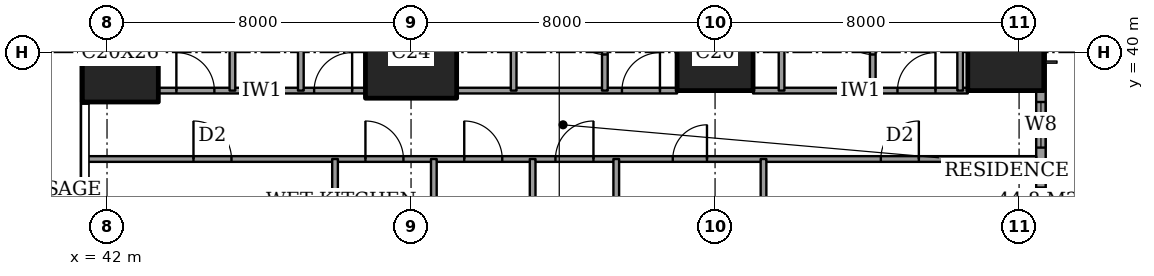
"""IFC4 building model, lengths in metres.
Left out: names, types, materials, properties, quantities, classifications, styles, units other than length and angle.
Written with IfcOpenShell. Run it as: python <this file> out.ifc"""

import sys

from ifc_helpers import new_model, si_unit, direction, frame, frame_2d, origin, origin_2d, place, context, subcontext, project, spatial, rectangle, extrude, element, fill, save


model = new_model("IFC4")
c1 = context("Model", 3, precision=1e-05, world=origin(), true_north=direction((0.0, 1.0)))
c2 = subcontext(c1, "Body", "Model", "MODEL_VIEW")
j1 = project(units=[si_unit("LENGTHUNIT", "METRE"), si_unit("PLANEANGLEUNIT", "RADIAN")], contexts=[c1])
p1 = place(None, origin())
s1 = spatial("IfcSite", under=j1, at=p1, CompositionType="ELEMENT")
p2 = place(p1, origin())
s2 = spatial("IfcBuilding", under=s1, at=p2, CompositionType="ELEMENT")
p3 = place(p2, frame((0.0, 0.0, 65.6)))
s3 = spatial("IfcBuildingStorey", under=s2, at=p3, CompositionType="ELEMENT", Elevation=65.6)
p4 = place(p3, frame((42.35, 40.0, 0.0), z_axis=(0.0, 0.0, 1.0), x_axis=(1.0, 0.0, 0.0)))
e1 = element("IfcColumn", 1, at=p4, inside=s3, PredefinedType="COLUMN", context=c2, shape_type="SweptSolid", body=[
    extrude(rectangle(XDim=2.0, YDim=2.6, at=origin_2d()), origin(), (0.0, 0.0, 1.0), 3.6),
])
p5 = place(p3, frame((50.0, 40.0, 0.0), z_axis=(0.0, 0.0, 1.0), x_axis=(1.0, 0.0, 0.0)))
e2 = element("IfcColumn", 2, at=p5, inside=s3, PredefinedType="COLUMN", context=c2, shape_type="SweptSolid", body=[
    extrude(rectangle(XDim=2.4, YDim=2.4, at=origin_2d()), origin(), (0.0, 0.0, 1.0), 3.6),
])
for number, where, z_axis, x_axis in (
    (3, (58.0, 40.0, 0.0), (0.0, 0.0, 1.0), (1.0, 0.0, 0.0)),
    (4, (65.65, 40.0, 0.0), (0.0, 0.0, 1.0), (1.0, 0.0, 0.0)),
):
    element("IfcColumn", number, at=place(p3, frame(where, z_axis=z_axis, x_axis=x_axis)), inside=s3, PredefinedType="COLUMN", context=c2, shape_type="SweptSolid", body=[
        extrude(rectangle(XDim=2.0, YDim=2.0, at=origin_2d()), origin(), (0.0, 0.0, 1.0), 3.6),
    ])
p6 = place(p3, frame((66.575, 3.175, 0.0), z_axis=(0.0, 0.0, 1.0), x_axis=(0.0, 1.0, 0.0)))
e5 = element("IfcWall", 5, at=p6, inside=s3, PredefinedType="SOLIDWALL", context=c2, shape_type="SweptSolid", body=[
    extrude(rectangle(XDim=41.65, YDim=0.25, at=frame_2d((20.825, 0.0))), origin(), (0.0, 0.0, 1.0), 3.6),
])
p7 = place(p6, frame((0.775, 0.0, 0.6)))
e6 = element("IfcOpeningElement", 6, at=p7, cuts=e5, PredefinedType="OPENING", context=c2, shape_type="SweptSolid", body=[
    extrude(rectangle(XDim=2.4, YDim=2.0, at=frame_2d((1.2, 1.0))), frame((0.0, 0.135, 0.0), z_axis=(0.0, -1.0, 0.0), x_axis=(1.0, 0.0, 0.0)), (0.0, 0.0, 1.0), 0.27),
])
p8 = place(p6, frame((6.1, 0.0, 0.6)))
e7 = element("IfcOpeningElement", 7, at=p8, cuts=e5, PredefinedType="OPENING", context=c2, shape_type="SweptSolid", body=[
    extrude(rectangle(XDim=1.2, YDim=2.0, at=frame_2d((0.6, 1.0))), frame((0.0, 0.135, 0.0), z_axis=(0.0, -1.0, 0.0), x_axis=(1.0, 0.0, 0.0)), (0.0, 0.0, 1.0), 0.27),
])
p9 = place(p6, frame((8.275, 0.0, 0.6)))
e8 = element("IfcOpeningElement", 8, at=p9, cuts=e5, PredefinedType="OPENING", context=c2, shape_type="SweptSolid", body=[
    extrude(rectangle(XDim=2.4, YDim=2.0, at=frame_2d((1.2, 1.0))), frame((0.0, 0.135, 0.0), z_axis=(0.0, -1.0, 0.0), x_axis=(1.0, 0.0, 0.0)), (0.0, 0.0, 1.0), 0.27),
])
p10 = place(p6, frame((15.775, 0.0, 0.6)))
e9 = element("IfcOpeningElement", 9, at=p10, cuts=e5, PredefinedType="OPENING", context=c2, shape_type="SweptSolid", body=[
    extrude(rectangle(XDim=2.4, YDim=2.0, at=frame_2d((1.2, 1.0))), frame((0.0, 0.135, 0.0), z_axis=(0.0, -1.0, 0.0), x_axis=(1.0, 0.0, 0.0)), (0.0, 0.0, 1.0), 0.27),
])
p11 = place(p6, frame((23.475, 0.0, 0.6)))
e10 = element("IfcOpeningElement", 10, at=p11, cuts=e5, PredefinedType="OPENING", context=c2, shape_type="SweptSolid", body=[
    extrude(rectangle(XDim=2.4, YDim=2.0, at=frame_2d((1.2, 1.0))), frame((0.0, 0.135, 0.0), z_axis=(0.0, -1.0, 0.0), x_axis=(1.0, 0.0, 0.0)), (0.0, 0.0, 1.0), 0.27),
])
p12 = place(p6, frame((30.875, 0.0, 0.6)))
e11 = element("IfcOpeningElement", 11, at=p12, cuts=e5, PredefinedType="OPENING", context=c2, shape_type="SweptSolid", body=[
    extrude(rectangle(XDim=2.4, YDim=2.0, at=frame_2d((1.2, 1.0))), frame((0.0, 0.135, 0.0), z_axis=(0.0, -1.0, 0.0), x_axis=(1.0, 0.0, 0.0)), (0.0, 0.0, 1.0), 0.27),
])
p13 = place(p6, frame((34.325, 0.0, 0.6)))
e12 = element("IfcOpeningElement", 12, at=p13, cuts=e5, PredefinedType="OPENING", context=c2, shape_type="SweptSolid", body=[
    extrude(rectangle(XDim=1.2, YDim=2.0, at=frame_2d((0.6, 1.0))), frame((0.0, 0.135, 0.0), z_axis=(0.0, -1.0, 0.0), x_axis=(1.0, 0.0, 0.0)), (0.0, 0.0, 1.0), 0.27),
])
p14 = place(p6, frame((38.475, 0.0, 0.6)))
e13 = element("IfcOpeningElement", 13, at=p14, cuts=e5, PredefinedType="OPENING", context=c2, shape_type="SweptSolid", body=[
    extrude(rectangle(XDim=2.4, YDim=2.0, at=frame_2d((1.2, 1.0))), frame((0.0, 0.135, 0.0), z_axis=(0.0, -1.0, 0.0), x_axis=(1.0, 0.0, 0.0)), (0.0, 0.0, 1.0), 0.27),
])
p15 = place(p3, frame((41.439, 37.2, 0.0), z_axis=(0.0, 0.0, 1.0), x_axis=(1.0, 0.0, 0.0)))
e14 = element("IfcWall", 14, at=p15, inside=s3, PredefinedType="PARTITIONING", context=c2, shape_type="SweptSolid", body=[
    extrude(rectangle(XDim=25.011, YDim=0.15, at=frame_2d((12.505, 0.0))), origin(), (0.0, 0.0, 1.0), 3.35),
])
p16 = place(p15, frame((12.361, 0.0, 0.0)))
e15 = element("IfcOpeningElement", 15, at=p16, cuts=e14, PredefinedType="OPENING", context=c2, shape_type="SweptSolid", body=[
    extrude(rectangle(XDim=1.0, YDim=2.1, at=frame_2d((0.5, 1.05))), frame((0.0, 0.085, 0.0), z_axis=(0.0, -1.0, 0.0), x_axis=(1.0, 0.0, 0.0)), (0.0, 0.0, 1.0), 0.17),
])
p17 = place(p15, frame((20.924, 0.0, 0.0)))
e16 = element("IfcOpeningElement", 16, at=p17, cuts=e14, PredefinedType="OPENING", context=c2, shape_type="SweptSolid", body=[
    extrude(rectangle(XDim=1.0, YDim=2.1, at=frame_2d((0.5, 1.05))), frame((0.0, 0.085, 0.0), z_axis=(0.0, -1.0, 0.0), x_axis=(1.0, 0.0, 0.0)), (0.0, 0.0, 1.0), 0.17),
])
p18 = place(p15, frame((15.448, 0.0, 0.0)))
e17 = element("IfcOpeningElement", 17, at=p18, cuts=e14, PredefinedType="OPENING", context=c2, shape_type="SweptSolid", body=[
    extrude(rectangle(XDim=0.9, YDim=2.1, at=frame_2d((0.45, 1.05))), frame((0.0, 0.085, 0.0), z_axis=(0.0, -1.0, 0.0), x_axis=(1.0, 0.0, 0.0)), (0.0, 0.0, 1.0), 0.17),
])
p19 = place(p15, frame((9.961, 0.0, 0.0)))
e18 = element("IfcOpeningElement", 18, at=p19, cuts=e14, PredefinedType="OPENING", context=c2, shape_type="SweptSolid", body=[
    extrude(rectangle(XDim=1.0, YDim=2.1, at=frame_2d((0.5, 1.05))), frame((0.0, 0.085, 0.0), z_axis=(0.0, -1.0, 0.0), x_axis=(1.0, 0.0, 0.0)), (0.0, 0.0, 1.0), 0.17),
])
p20 = place(p15, frame((7.361, 0.0, 0.0)))
e19 = element("IfcOpeningElement", 19, at=p20, cuts=e14, PredefinedType="OPENING", context=c2, shape_type="SweptSolid", body=[
    extrude(rectangle(XDim=1.0, YDim=2.1, at=frame_2d((0.5, 1.05))), frame((0.0, 0.085, 0.0), z_axis=(0.0, -1.0, 0.0), x_axis=(1.0, 0.0, 0.0)), (0.0, 0.0, 1.0), 0.17),
])
p21 = place(p15, frame((2.836, 0.0, 0.0)))
e20 = element("IfcOpeningElement", 20, at=p21, cuts=e14, PredefinedType="OPENING", context=c2, shape_type="SweptSolid", body=[
    extrude(rectangle(XDim=1.0, YDim=2.1, at=frame_2d((0.5, 1.05))), frame((0.0, 0.085, 0.0), z_axis=(0.0, -1.0, 0.0), x_axis=(1.0, 0.0, 0.0)), (0.0, 0.0, 1.0), 0.17),
])
p22 = place(p3, frame((43.35, 39.0, 0.0), z_axis=(0.0, 0.0, 1.0), x_axis=(1.0, 0.0, 0.0)))
e21 = element("IfcWall", 21, at=p22, inside=s3, PredefinedType="PARTITIONING", context=c2, shape_type="SweptSolid", body=[
    extrude(rectangle(XDim=5.45, YDim=0.15, at=frame_2d((2.725, 0.0))), origin(), (0.0, 0.0, 1.0), 3.35),
])
p23 = place(p22, frame((4.1, 0.0, 0.0)))
e22 = element("IfcOpeningElement", 22, at=p23, cuts=e21, PredefinedType="OPENING", context=c2, shape_type="SweptSolid", body=[
    extrude(rectangle(XDim=1.0, YDim=2.1, at=frame_2d((0.5, 1.05))), frame((0.0, 0.085, 0.0), z_axis=(0.0, -1.0, 0.0), x_axis=(1.0, 0.0, 0.0)), (0.0, 0.0, 1.0), 0.17),
])
p24 = place(p22, frame((0.475, 0.0, 0.0)))
e23 = element("IfcOpeningElement", 23, at=p24, cuts=e21, PredefinedType="OPENING", context=c2, shape_type="SweptSolid", body=[
    extrude(rectangle(XDim=1.0, YDim=2.1, at=frame_2d((0.5, 1.05))), frame((0.0, 0.085, 0.0), z_axis=(0.0, -1.0, 0.0), x_axis=(1.0, 0.0, 0.0)), (0.0, 0.0, 1.0), 0.17),
])
p25 = place(p3, frame((51.2, 39.0, 0.0), z_axis=(0.0, 0.0, 1.0), x_axis=(1.0, 0.0, 0.0)))
e24 = element("IfcWall", 24, at=p25, inside=s3, PredefinedType="PARTITIONING", context=c2, shape_type="SweptSolid", body=[
    extrude(rectangle(XDim=5.8, YDim=0.15, at=frame_2d((2.9, 0.0))), origin(), (0.0, 0.0, 1.0), 3.35),
])
p26 = place(p25, frame((4.35, 0.0, 0.0)))
e25 = element("IfcOpeningElement", 25, at=p26, cuts=e24, PredefinedType="OPENING", context=c2, shape_type="SweptSolid", body=[
    extrude(rectangle(XDim=1.0, YDim=2.1, at=frame_2d((0.5, 1.05))), frame((0.0, 0.085, 0.0), z_axis=(0.0, -1.0, 0.0), x_axis=(1.0, 0.0, 0.0)), (0.0, 0.0, 1.0), 0.17),
])
p27 = place(p3, frame((59.0, 39.0, 0.0), z_axis=(0.0, 0.0, 1.0), x_axis=(1.0, 0.0, 0.0)))
e26 = element("IfcWall", 26, at=p27, inside=s3, PredefinedType="PARTITIONING", context=c2, shape_type="SweptSolid", body=[
    extrude(rectangle(XDim=5.65, YDim=0.15, at=frame_2d((2.825, 0.0))), origin(), (0.0, 0.0, 1.0), 3.35),
])
p28 = place(p27, frame((3.8, 0.0, 0.0)))
e27 = element("IfcOpeningElement", 27, at=p28, cuts=e26, PredefinedType="OPENING", context=c2, shape_type="SweptSolid", body=[
    extrude(rectangle(XDim=1.0, YDim=2.1, at=frame_2d((0.5, 1.05))), frame((0.0, 0.085, 0.0), z_axis=(0.0, -1.0, 0.0), x_axis=(1.0, 0.0, 0.0)), (0.0, 0.0, 1.0), 0.17),
])
p29 = place(p3, frame((45.3, 39.0, 0.0), z_axis=(0.0, 0.0, 1.0), x_axis=(0.0, 1.0, 0.0)))
e28 = element("IfcWall", 28, at=p29, inside=s3, PredefinedType="PARTITIONING", context=c2, shape_type="SweptSolid", body=[
    extrude(rectangle(XDim=9.45, YDim=0.15, at=frame_2d((4.725, 0.0))), origin(), (0.0, 0.0, 1.0), 3.35),
])
p30 = place(p3, frame((47.1, 39.0, 0.0), z_axis=(0.0, 0.0, 1.0), x_axis=(0.0, 1.0, 0.0)))
e29 = element("IfcWall", 29, at=p30, inside=s3, PredefinedType="PARTITIONING", context=c2, shape_type="SweptSolid", body=[
    extrude(rectangle(XDim=3.8, YDim=0.15, at=frame_2d((1.9, 0.0))), origin(), (0.0, 0.0, 1.0), 3.35),
])
p31 = place(p30, frame((1.45, 0.0, 0.0)))
e30 = element("IfcOpeningElement", 30, at=p31, cuts=e29, PredefinedType="OPENING", context=c2, shape_type="SweptSolid", body=[
    extrude(rectangle(XDim=0.9, YDim=2.1, at=frame_2d((0.45, 1.05))), frame((0.0, 0.085, 0.0), z_axis=(0.0, -1.0, 0.0), x_axis=(1.0, 0.0, 0.0)), (0.0, 0.0, 1.0), 0.17),
])
p32 = place(p3, frame((48.0, 30.5, 0.0), z_axis=(0.0, 0.0, 1.0), x_axis=(0.0, 1.0, 0.0)))
e31 = element("IfcWall", 31, at=p32, inside=s3, PredefinedType="PARTITIONING", context=c2, shape_type="SweptSolid", body=[
    extrude(rectangle(XDim=6.7, YDim=0.15, at=frame_2d((3.35, 0.0))), origin(), (0.0, 0.0, 1.0), 3.35),
])
p33 = place(p3, frame((50.6, 33.2, 0.0), z_axis=(0.0, 0.0, 1.0), x_axis=(0.0, 1.0, 0.0)))
e32 = element("IfcWall", 32, at=p33, inside=s3, PredefinedType="PARTITIONING", context=c2, shape_type="SweptSolid", body=[
    extrude(rectangle(XDim=4.0, YDim=0.15, at=frame_2d((2.0, 0.0))), origin(), (0.0, 0.0, 1.0), 3.35),
])
p34 = place(p3, frame((52.7, 39.0, 0.0), z_axis=(0.0, 0.0, 1.0), x_axis=(0.0, 1.0, 0.0)))
e33 = element("IfcWall", 33, at=p34, inside=s3, PredefinedType="PARTITIONING", context=c2, shape_type="SweptSolid", body=[
    extrude(rectangle(XDim=9.45, YDim=0.15, at=frame_2d((4.725, 0.0))), origin(), (0.0, 0.0, 1.0), 3.35),
])
p35 = place(p34, frame((5.675, 0.0, 0.0)))
e34 = element("IfcOpeningElement", 34, at=p35, cuts=e33, PredefinedType="OPENING", context=c2, shape_type="SweptSolid", body=[
    extrude(rectangle(XDim=0.9, YDim=2.1, at=frame_2d((0.45, 1.05))), frame((0.0, 0.085, 0.0), z_axis=(0.0, -1.0, 0.0), x_axis=(1.0, 0.0, 0.0)), (0.0, 0.0, 1.0), 0.17),
])
p36 = place(p3, frame((53.2, 30.0, 0.0), z_axis=(0.0, 0.0, 1.0), x_axis=(0.0, 1.0, 0.0)))
e35 = element("IfcWall", 35, at=p36, inside=s3, PredefinedType="PARTITIONING", context=c2, shape_type="SweptSolid", body=[
    extrude(rectangle(XDim=7.2, YDim=0.15, at=frame_2d((3.6, 0.0))), origin(), (0.0, 0.0, 1.0), 3.35),
])
p37 = place(p3, frame((55.1, 39.0, 0.0), z_axis=(0.0, 0.0, 1.0), x_axis=(0.0, 1.0, 0.0)))
e36 = element("IfcWall", 36, at=p37, inside=s3, PredefinedType="PARTITIONING", context=c2, shape_type="SweptSolid", body=[
    extrude(rectangle(XDim=2.8, YDim=0.15, at=frame_2d((1.4, 0.0))), origin(), (0.0, 0.0, 1.0), 3.35),
])
p38 = place(p37, frame((0.95, 0.0, 0.0)))
e37 = element("IfcOpeningElement", 37, at=p38, cuts=e36, PredefinedType="OPENING", context=c2, shape_type="SweptSolid", body=[
    extrude(rectangle(XDim=0.9, YDim=2.1, at=frame_2d((0.45, 1.05))), frame((0.0, 0.085, 0.0), z_axis=(0.0, -1.0, 0.0), x_axis=(1.0, 0.0, 0.0)), (0.0, 0.0, 1.0), 0.17),
])
p39 = place(p3, frame((55.4, 28.0, 0.0), z_axis=(0.0, 0.0, 1.0), x_axis=(0.0, 1.0, 0.0)))
e38 = element("IfcWall", 38, at=p39, inside=s3, PredefinedType="PARTITIONING", context=c2, shape_type="SweptSolid", body=[
    extrude(rectangle(XDim=9.2, YDim=0.15, at=frame_2d((4.6, 0.0))), origin(), (0.0, 0.0, 1.0), 3.35),
])
p40 = place(p39, frame((0.5, 0.0, 0.0)))
e39 = element("IfcOpeningElement", 39, at=p40, cuts=e38, PredefinedType="OPENING", context=c2, shape_type="SweptSolid", body=[
    extrude(rectangle(XDim=1.0, YDim=2.1, at=frame_2d((0.5, 1.05))), frame((0.0, 0.085, 0.0), z_axis=(0.0, -1.0, 0.0), x_axis=(1.0, 0.0, 0.0)), (0.0, 0.0, 1.0), 0.17),
])
p41 = place(p3, frame((59.275, 33.2, 0.0), z_axis=(0.0, 0.0, 1.0), x_axis=(0.0, 1.0, 0.0)))
e40 = element("IfcWall", 40, at=p41, inside=s3, PredefinedType="PARTITIONING", context=c2, shape_type="SweptSolid", body=[
    extrude(rectangle(XDim=4.0, YDim=0.15, at=frame_2d((2.0, 0.0))), origin(), (0.0, 0.0, 1.0), 3.35),
])
p42 = place(p3, frame((59.75, 39.0, 0.0), z_axis=(0.0, 0.0, 1.0), x_axis=(0.0, 1.0, 0.0)))
e41 = element("IfcWall", 41, at=p42, inside=s3, PredefinedType="PARTITIONING", context=c2, shape_type="SweptSolid", body=[
    extrude(rectangle(XDim=9.45, YDim=0.15, at=frame_2d((4.725, 0.0))), origin(), (0.0, 0.0, 1.0), 3.35),
])
p43 = place(p42, frame((5.675, 0.0, 0.0)))
e42 = element("IfcOpeningElement", 42, at=p43, cuts=e41, PredefinedType="OPENING", context=c2, shape_type="SweptSolid", body=[
    extrude(rectangle(XDim=0.9, YDim=2.1, at=frame_2d((0.45, 1.05))), frame((0.0, 0.085, 0.0), z_axis=(0.0, -1.0, 0.0), x_axis=(1.0, 0.0, 0.0)), (0.0, 0.0, 1.0), 0.17),
])
p44 = place(p3, frame((62.15, 39.0, 0.0), z_axis=(0.0, 0.0, 1.0), x_axis=(0.0, 1.0, 0.0)))
e43 = element("IfcWall", 43, at=p44, inside=s3, PredefinedType="PARTITIONING", context=c2, shape_type="SweptSolid", body=[
    extrude(rectangle(XDim=2.8, YDim=0.15, at=frame_2d((1.4, 0.0))), origin(), (0.0, 0.0, 1.0), 3.35),
])
p45 = place(p44, frame((0.95, 0.0, 0.0)))
e44 = element("IfcOpeningElement", 44, at=p45, cuts=e43, PredefinedType="OPENING", context=c2, shape_type="SweptSolid", body=[
    extrude(rectangle(XDim=0.9, YDim=2.1, at=frame_2d((0.45, 1.05))), frame((0.0, 0.085, 0.0), z_axis=(0.0, -1.0, 0.0), x_axis=(1.0, 0.0, 0.0)), (0.0, 0.0, 1.0), 0.17),
])
p46 = place(p3, frame((64.45, 39.0, 0.0), z_axis=(0.0, 0.0, 1.0), x_axis=(0.0, 1.0, 0.0)))
e45 = element("IfcWall", 45, at=p46, inside=s3, PredefinedType="PARTITIONING", context=c2, shape_type="SweptSolid", body=[
    extrude(rectangle(XDim=5.7, YDim=0.15, at=frame_2d((2.85, 0.0))), origin(), (0.0, 0.0, 1.0), 3.35),
])
p47 = place(p46, frame((2.4, 0.0, 0.0)))
e46 = element("IfcOpeningElement", 46, at=p47, cuts=e45, PredefinedType="OPENING", context=c2, shape_type="SweptSolid", body=[
    extrude(rectangle(XDim=0.9, YDim=2.1, at=frame_2d((0.45, 1.05))), frame((0.0, 0.085, 0.0), z_axis=(0.0, -1.0, 0.0), x_axis=(1.0, 0.0, 0.0)), (0.0, 0.0, 1.0), 0.17),
])
p48 = place(p12, origin())
e47 = element("IfcWindow", 47, at=p48, inside=s3, PartitioningType="SINGLE_PANEL", PredefinedType="WINDOW", context=c2, shape_type="SweptSolid", body=[
    extrude(rectangle(XDim=2.4, YDim=2.0, at=frame_2d((1.2, 1.0))), frame((0.0, 0.03, 0.0), z_axis=(0.0, -1.0, 0.0), x_axis=(1.0, 0.0, 0.0)), (0.0, 0.0, 1.0), 0.06),
])
fill(e11, e47)
p49 = place(p13, origin())
e48 = element("IfcWindow", 48, at=p49, inside=s3, PartitioningType="SINGLE_PANEL", PredefinedType="WINDOW", context=c2, shape_type="SweptSolid", body=[
    extrude(rectangle(XDim=1.2, YDim=2.0, at=frame_2d((0.6, 1.0))), frame((0.0, 0.03, 0.0), z_axis=(0.0, -1.0, 0.0), x_axis=(1.0, 0.0, 0.0)), (0.0, 0.0, 1.0), 0.06),
])
fill(e12, e48)
p50 = place(p45, origin())
e49 = element("IfcDoor", 49, at=p50, inside=s3, OperationType="SINGLE_SWING_LEFT", PredefinedType="DOOR", context=c2, shape_type="SweptSolid", body=[
    extrude(rectangle(XDim=0.9, YDim=2.1, at=frame_2d((0.45, 1.05))), frame((0.0, 0.025, 0.0), z_axis=(0.0, -1.0, 0.0), x_axis=(1.0, 0.0, 0.0)), (0.0, 0.0, 1.0), 0.05),
])
fill(e44, e49)
p51 = place(p28, origin())
e50 = element("IfcDoor", 50, at=p51, inside=s3, OperationType="SINGLE_SWING_LEFT", PredefinedType="DOOR", context=c2, shape_type="SweptSolid", body=[
    extrude(rectangle(XDim=1.0, YDim=2.1, at=frame_2d((0.5, 1.05))), frame((0.0, 0.025, 0.0), z_axis=(0.0, -1.0, 0.0), x_axis=(1.0, 0.0, 0.0)), (0.0, 0.0, 1.0), 0.05),
])
fill(e27, e50)
p52 = place(p38, origin())
e51 = element("IfcDoor", 51, at=p52, inside=s3, OperationType="SINGLE_SWING_LEFT", PredefinedType="DOOR", context=c2, shape_type="SweptSolid", body=[
    extrude(rectangle(XDim=0.9, YDim=2.1, at=frame_2d((0.45, 1.05))), frame((0.0, 0.025, 0.0), z_axis=(0.0, -1.0, 0.0), x_axis=(1.0, 0.0, 0.0)), (0.0, 0.0, 1.0), 0.05),
])
fill(e37, e51)
p53 = place(p26, origin())
e52 = element("IfcDoor", 52, at=p53, inside=s3, OperationType="SINGLE_SWING_LEFT", PredefinedType="DOOR", context=c2, shape_type="SweptSolid", body=[
    extrude(rectangle(XDim=1.0, YDim=2.1, at=frame_2d((0.5, 1.05))), frame((0.0, 0.025, 0.0), z_axis=(0.0, -1.0, 0.0), x_axis=(1.0, 0.0, 0.0)), (0.0, 0.0, 1.0), 0.05),
])
fill(e25, e52)
p54 = place(p23, origin())
e53 = element("IfcDoor", 53, at=p54, inside=s3, OperationType="SINGLE_SWING_LEFT", PredefinedType="DOOR", context=c2, shape_type="SweptSolid", body=[
    extrude(rectangle(XDim=1.0, YDim=2.1, at=frame_2d((0.5, 1.05))), frame((0.0, 0.025, 0.0), z_axis=(0.0, -1.0, 0.0), x_axis=(1.0, 0.0, 0.0)), (0.0, 0.0, 1.0), 0.05),
])
fill(e22, e53)
p55 = place(p24, origin())
e54 = element("IfcDoor", 54, at=p55, inside=s3, OperationType="SINGLE_SWING_RIGHT", PredefinedType="DOOR", context=c2, shape_type="SweptSolid", body=[
    extrude(rectangle(XDim=1.0, YDim=2.1, at=frame_2d((0.5, 1.05))), frame((0.0, 0.025, 0.0), z_axis=(0.0, -1.0, 0.0), x_axis=(1.0, 0.0, 0.0)), (0.0, 0.0, 1.0), 0.05),
])
fill(e23, e54)
p56 = place(p16, origin())
e55 = element("IfcDoor", 55, at=p56, inside=s3, OperationType="SINGLE_SWING_LEFT", PredefinedType="DOOR", context=c2, shape_type="SweptSolid", body=[
    extrude(rectangle(XDim=1.0, YDim=2.1, at=frame_2d((0.5, 1.05))), frame((0.0, 0.025, 0.0), z_axis=(0.0, -1.0, 0.0), x_axis=(1.0, 0.0, 0.0)), (0.0, 0.0, 1.0), 0.05),
])
fill(e15, e55)
p57 = place(p17, origin())
e56 = element("IfcDoor", 56, at=p57, inside=s3, OperationType="SINGLE_SWING_LEFT", PredefinedType="DOOR", context=c2, shape_type="SweptSolid", body=[
    extrude(rectangle(XDim=1.0, YDim=2.1, at=frame_2d((0.5, 1.05))), frame((0.0, 0.025, 0.0), z_axis=(0.0, -1.0, 0.0), x_axis=(1.0, 0.0, 0.0)), (0.0, 0.0, 1.0), 0.05),
])
fill(e16, e56)
p58 = place(p18, origin())
e57 = element("IfcDoor", 57, at=p58, inside=s3, OperationType="SINGLE_SWING_LEFT", PredefinedType="DOOR", context=c2, shape_type="SweptSolid", body=[
    extrude(rectangle(XDim=0.9, YDim=2.1, at=frame_2d((0.45, 1.05))), frame((0.0, 0.025, 0.0), z_axis=(0.0, -1.0, 0.0), x_axis=(1.0, 0.0, 0.0)), (0.0, 0.0, 1.0), 0.05),
])
fill(e17, e57)
p59 = place(p19, origin())
e58 = element("IfcDoor", 58, at=p59, inside=s3, OperationType="SINGLE_SWING_RIGHT", PredefinedType="DOOR", context=c2, shape_type="SweptSolid", body=[
    extrude(rectangle(XDim=1.0, YDim=2.1, at=frame_2d((0.5, 1.05))), frame((0.0, 0.025, 0.0), z_axis=(0.0, -1.0, 0.0), x_axis=(1.0, 0.0, 0.0)), (0.0, 0.0, 1.0), 0.05),
])
fill(e18, e58)
p60 = place(p20, origin())
e59 = element("IfcDoor", 59, at=p60, inside=s3, OperationType="SINGLE_SWING_RIGHT", PredefinedType="DOOR", context=c2, shape_type="SweptSolid", body=[
    extrude(rectangle(XDim=1.0, YDim=2.1, at=frame_2d((0.5, 1.05))), frame((0.0, 0.025, 0.0), z_axis=(0.0, -1.0, 0.0), x_axis=(1.0, 0.0, 0.0)), (0.0, 0.0, 1.0), 0.05),
])
fill(e19, e59)
p61 = place(p21, origin())
e60 = element("IfcDoor", 60, at=p61, inside=s3, OperationType="SINGLE_SWING_RIGHT", PredefinedType="DOOR", context=c2, shape_type="SweptSolid", body=[
    extrude(rectangle(XDim=1.0, YDim=2.1, at=frame_2d((0.5, 1.05))), frame((0.0, 0.025, 0.0), z_axis=(0.0, -1.0, 0.0), x_axis=(1.0, 0.0, 0.0)), (0.0, 0.0, 1.0), 0.05),
])
fill(e20, e60)
save(model, sys.argv[1])
